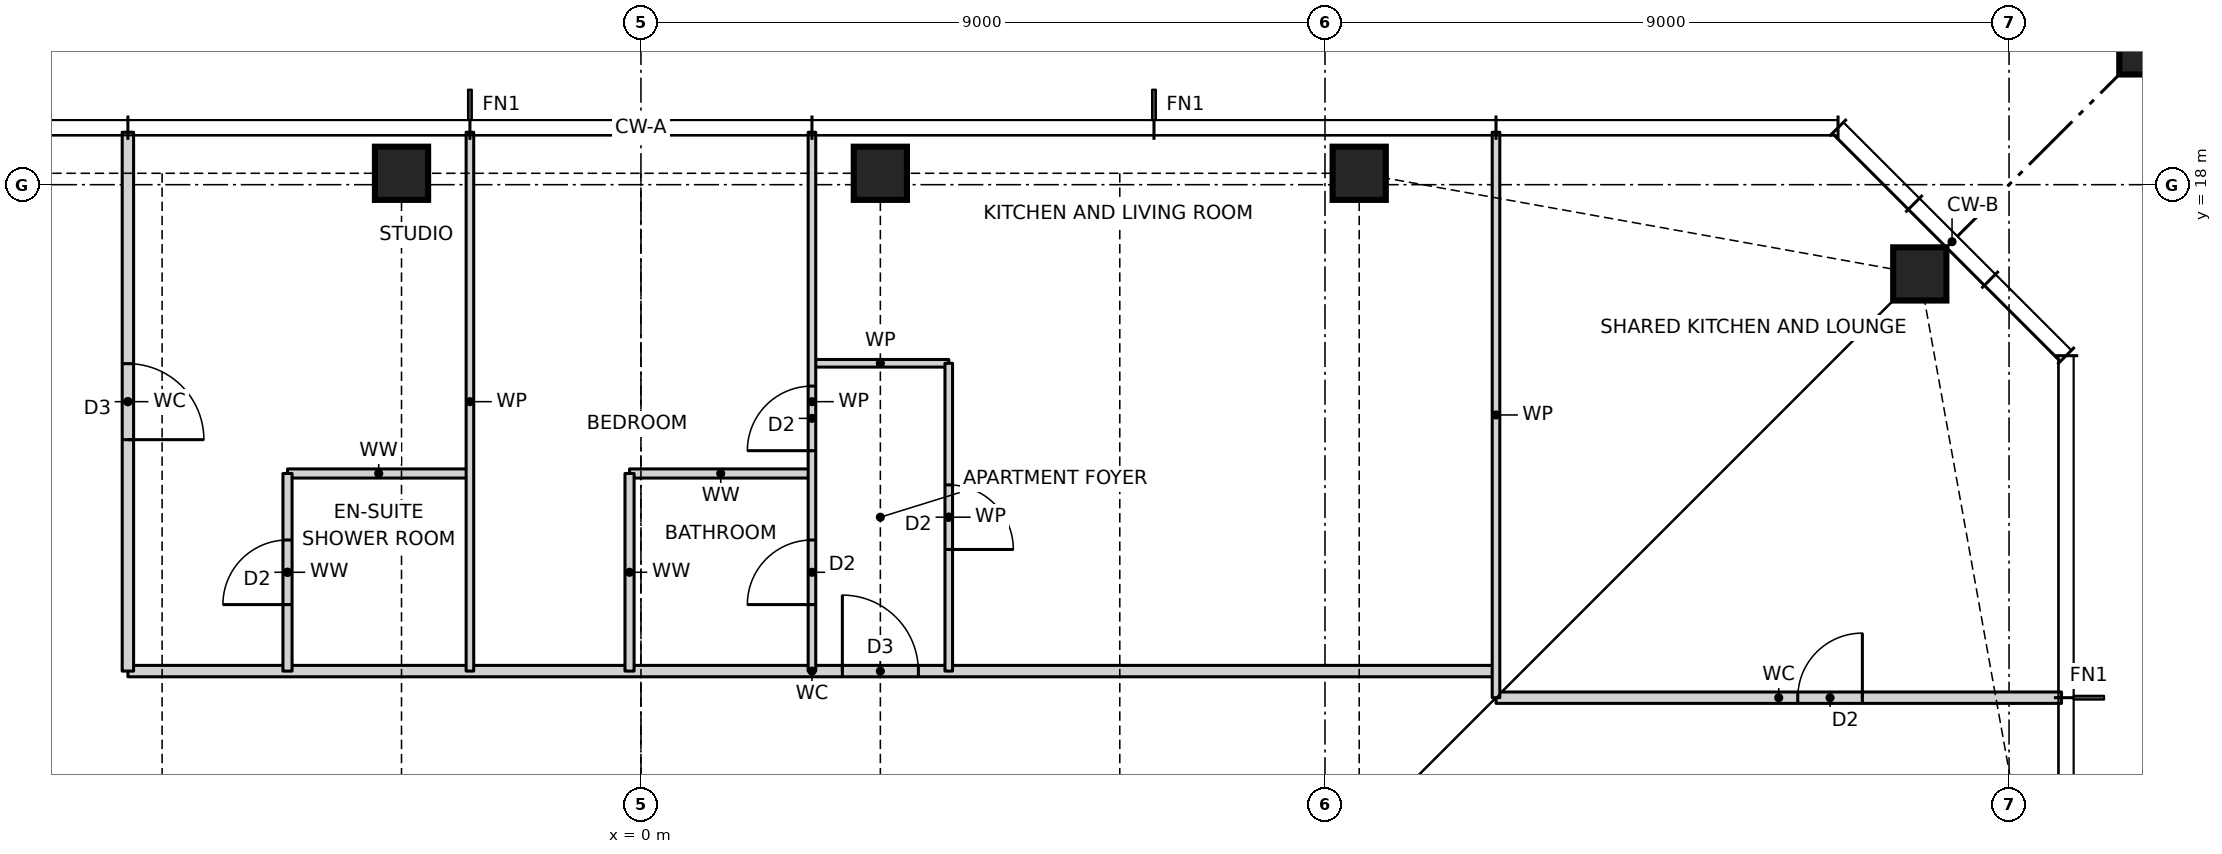
"""IFC4 building model, lengths in metres.
Left out: names, types, materials, properties, quantities, classifications, styles, units other than length and angle.
Written with IfcOpenShell. Run it as: python <this file> out.ifc"""

import sys

from ifc_helpers import new_model, si_unit, direction, frame, frame_2d, origin, origin_2d, place, context, subcontext, project, spatial, rectangle, hollow_rectangle, i_section, extrude, element, fill, save


model = new_model("IFC4")
c1 = context("Model", 3, precision=1e-05, world=origin(), true_north=direction((0.0, 1.0)))
c2 = subcontext(c1, "Body", "Model", "MODEL_VIEW")
j1 = project(units=[si_unit("LENGTHUNIT", "METRE"), si_unit("PLANEANGLEUNIT", "RADIAN")], contexts=[c1])
p1 = place(None, origin())
s1 = spatial("IfcSite", under=j1, at=p1, CompositionType="ELEMENT")
p2 = place(p1, origin())
s2 = spatial("IfcBuilding", under=s1, at=p2, CompositionType="ELEMENT")
p3 = place(p2, frame((0.0, 0.0, 163.5)))
s3 = spatial("IfcBuildingStorey", under=s2, at=p3, CompositionType="ELEMENT", Elevation=163.5)
for number, where, z_axis, x_axis in (
    (1, (16.826, 16.826, 0.0), (0.0, 0.0, 1.0), (1.0, 0.0, 0.0)),
    (2, (9.45, 18.15, 0.0), (0.0, 0.0, 1.0), (1.0, 0.0, 0.0)),
    (3, (3.15, 18.15, 0.0), (0.0, 0.0, 1.0), (1.0, 0.0, 0.0)),
    (4, (-3.15, 18.15, 0.0), (0.0, 0.0, 1.0), (1.0, 0.0, 0.0)),
):
    element("IfcColumn", number, at=place(p3, frame(where, z_axis=z_axis, x_axis=x_axis)), inside=s3, PredefinedType="COLUMN", context=c2, shape_type="SweptSolid", body=[
        extrude(hollow_rectangle(XDim=0.7, YDim=0.7, WallThickness=0.06, at=origin_2d()), origin(), (0.0, 0.0, 1.0), 3.5),
    ])
p4 = place(p3, frame((21.65, 21.65, 0.0), z_axis=(0.0, 0.0, 1.0), x_axis=(1.0, 0.0, 0.0)))
e5 = element("IfcColumn", 5, at=p4, inside=s3, PredefinedType="COLUMN", context=c2, shape_type="SweptSolid", body=[
    extrude(rectangle(XDim=4.4, YDim=4.4, at=origin_2d()), origin(), (0.0, 0.0, 1.0), 3.5),
    extrude(i_section(OverallWidth=0.478, OverallDepth=0.599, WebThickness=0.1, FlangeThickness=0.14, at=origin_2d()), origin(), (0.0, 0.0, 1.0), 3.5),
])
p5 = place(p3, frame((11.25, 11.25, 0.0), z_axis=(0.0, 0.0, 1.0), x_axis=(1.0, 0.0, 0.0)))
e6 = element("IfcWall", 6, at=p5, inside=s3, PredefinedType="PARTITIONING", context=c2, shape_type="SweptSolid", body=[
    extrude(rectangle(XDim=7.44, YDim=0.15, at=frame_2d((3.72, 0.0))), origin(), (0.0, 0.0, 1.0), 3.27),
])
p6 = place(p5, frame((3.97, 0.0, 0.0)))
e7 = element("IfcOpeningElement", 7, at=p6, cuts=e6, PredefinedType="OPENING", context=c2, shape_type="SweptSolid", body=[
    extrude(rectangle(XDim=0.85, YDim=2.1, at=frame_2d((0.425, 1.05))), frame((0.0, 0.085, 0.0), z_axis=(0.0, -1.0, 0.0), x_axis=(1.0, 0.0, 0.0)), (0.0, 0.0, 1.0), 0.17),
])
p7 = place(p3, frame((-6.75, 11.6, 0.0), z_axis=(0.0, 0.0, 1.0), x_axis=(1.0, 0.0, 0.0)))
e8 = element("IfcWall", 8, at=p7, inside=s3, PredefinedType="PARTITIONING", context=c2, shape_type="SweptSolid", body=[
    extrude(rectangle(XDim=18.0, YDim=0.15, at=frame_2d((9.0, 0.0))), origin(), (0.0, 0.0, 1.0), 3.27),
])
p8 = place(p7, frame((9.4, 0.0, 0.0)))
e9 = element("IfcOpeningElement", 9, at=p8, cuts=e8, PredefinedType="OPENING", context=c2, shape_type="SweptSolid", body=[
    extrude(rectangle(XDim=1.0, YDim=2.1, at=frame_2d((0.5, 1.05))), frame((0.0, 0.085, 0.0), z_axis=(0.0, -1.0, 0.0), x_axis=(1.0, 0.0, 0.0)), (0.0, 0.0, 1.0), 0.17),
])
for number, where, z_axis, x_axis in (
    (10, (-4.65, 14.2, 0.0), (0.0, 0.0, 1.0), (1.0, 0.0, 0.0)),
    (11, (-0.15, 14.2, 0.0), (0.0, 0.0, 1.0), (1.0, 0.0, 0.0)),
):
    element("IfcWall", number, at=place(p3, frame(where, z_axis=z_axis, x_axis=x_axis)), inside=s3, PredefinedType="PARTITIONING", context=c2, shape_type="SweptSolid", body=[
        extrude(rectangle(XDim=2.4, YDim=0.12, at=frame_2d((1.2, 0.0))), origin(), (0.0, 0.0, 1.0), 3.27),
    ])
p9 = place(p3, frame((2.25, 15.65, 0.0), z_axis=(0.0, 0.0, 1.0), x_axis=(1.0, 0.0, 0.0)))
e12 = element("IfcWall", 12, at=p9, inside=s3, PredefinedType="PARTITIONING", context=c2, shape_type="SweptSolid", body=[
    extrude(rectangle(XDim=1.8, YDim=0.1, at=frame_2d((0.9, 0.0))), origin(), (0.0, 0.0, 1.0), 3.27),
])
p10 = place(p3, frame((11.25, 11.25, 0.0), z_axis=(0.0, 0.0, 1.0), x_axis=(0.0, 1.0, 0.0)))
e13 = element("IfcWall", 13, at=p10, inside=s3, PredefinedType="PARTITIONING", context=c2, shape_type="SweptSolid", body=[
    extrude(rectangle(XDim=7.44, YDim=0.1, at=frame_2d((3.72, 0.0))), origin(), (0.0, 0.0, 1.0), 3.27),
])
p11 = place(p3, frame((4.05, 11.6, 0.0), z_axis=(0.0, 0.0, 1.0), x_axis=(0.0, 1.0, 0.0)))
e14 = element("IfcWall", 14, at=p11, inside=s3, PredefinedType="PARTITIONING", context=c2, shape_type="SweptSolid", body=[
    extrude(rectangle(XDim=4.05, YDim=0.1, at=frame_2d((2.025, 0.0))), origin(), (0.0, 0.0, 1.0), 3.27),
])
p12 = place(p11, frame((1.6, 0.0, 0.0)))
e15 = element("IfcOpeningElement", 15, at=p12, cuts=e14, PredefinedType="OPENING", context=c2, shape_type="SweptSolid", body=[
    extrude(rectangle(XDim=0.85, YDim=2.1, at=frame_2d((0.425, 1.05))), frame((0.0, 0.06, 0.0), z_axis=(0.0, -1.0, 0.0), x_axis=(1.0, 0.0, 0.0)), (0.0, 0.0, 1.0), 0.12),
])
p13 = place(p3, frame((2.25, 11.6, 0.0), z_axis=(0.0, 0.0, 1.0), x_axis=(0.0, 1.0, 0.0)))
e16 = element("IfcWall", 16, at=p13, inside=s3, PredefinedType="PARTITIONING", context=c2, shape_type="SweptSolid", body=[
    extrude(rectangle(XDim=7.09, YDim=0.1, at=frame_2d((3.545, 0.0))), origin(), (0.0, 0.0, 1.0), 3.27),
])
p14 = place(p13, frame((2.9, 0.0, 0.0)))
e17 = element("IfcOpeningElement", 17, at=p14, cuts=e16, PredefinedType="OPENING", context=c2, shape_type="SweptSolid", body=[
    extrude(rectangle(XDim=0.85, YDim=2.1, at=frame_2d((0.425, 1.05))), frame((0.0, 0.06, 0.0), z_axis=(0.0, -1.0, 0.0), x_axis=(1.0, 0.0, 0.0)), (0.0, 0.0, 1.0), 0.12),
])
p15 = place(p13, frame((0.875, 0.0, 0.0)))
e18 = element("IfcOpeningElement", 18, at=p15, cuts=e16, PredefinedType="OPENING", context=c2, shape_type="SweptSolid", body=[
    extrude(rectangle(XDim=0.85, YDim=2.1, at=frame_2d((0.425, 1.05))), frame((0.0, 0.06, 0.0), z_axis=(0.0, -1.0, 0.0), x_axis=(1.0, 0.0, 0.0)), (0.0, 0.0, 1.0), 0.12),
])
p16 = place(p3, frame((-0.15, 11.6, 0.0), z_axis=(0.0, 0.0, 1.0), x_axis=(0.0, 1.0, 0.0)))
e19 = element("IfcWall", 19, at=p16, inside=s3, PredefinedType="PARTITIONING", context=c2, shape_type="SweptSolid", body=[
    extrude(rectangle(XDim=2.6, YDim=0.12, at=frame_2d((1.3, 0.0))), origin(), (0.0, 0.0, 1.0), 3.27),
])
p17 = place(p3, frame((-2.25, 11.6, 0.0), z_axis=(0.0, 0.0, 1.0), x_axis=(0.0, 1.0, 0.0)))
e20 = element("IfcWall", 20, at=p17, inside=s3, PredefinedType="PARTITIONING", context=c2, shape_type="SweptSolid", body=[
    extrude(rectangle(XDim=7.09, YDim=0.1, at=frame_2d((3.545, 0.0))), origin(), (0.0, 0.0, 1.0), 3.27),
])
p18 = place(p3, frame((-4.65, 11.6, 0.0), z_axis=(0.0, 0.0, 1.0), x_axis=(0.0, 1.0, 0.0)))
e21 = element("IfcWall", 21, at=p18, inside=s3, PredefinedType="PARTITIONING", context=c2, shape_type="SweptSolid", body=[
    extrude(rectangle(XDim=2.6, YDim=0.12, at=frame_2d((1.3, 0.0))), origin(), (0.0, 0.0, 1.0), 3.27),
])
p19 = place(p18, frame((0.875, 0.0, 0.0)))
e22 = element("IfcOpeningElement", 22, at=p19, cuts=e21, PredefinedType="OPENING", context=c2, shape_type="SweptSolid", body=[
    extrude(rectangle(XDim=0.85, YDim=2.1, at=frame_2d((0.425, 1.05))), frame((0.0, 0.07, 0.0), z_axis=(0.0, -1.0, 0.0), x_axis=(1.0, 0.0, 0.0)), (0.0, 0.0, 1.0), 0.14),
])
p20 = place(p3, frame((-6.75, 11.6, 0.0), z_axis=(0.0, 0.0, 1.0), x_axis=(0.0, 1.0, 0.0)))
e23 = element("IfcWall", 23, at=p20, inside=s3, PredefinedType="PARTITIONING", context=c2, shape_type="SweptSolid", body=[
    extrude(rectangle(XDim=7.09, YDim=0.15, at=frame_2d((3.545, 0.0))), origin(), (0.0, 0.0, 1.0), 3.27),
])
p21 = place(p20, frame((3.045, 0.0, 0.0)))
e24 = element("IfcOpeningElement", 24, at=p21, cuts=e23, PredefinedType="OPENING", context=c2, shape_type="SweptSolid", body=[
    extrude(rectangle(XDim=1.0, YDim=2.1, at=frame_2d((0.5, 1.05))), frame((0.0, 0.085, 0.0), z_axis=(0.0, -1.0, 0.0), x_axis=(1.0, 0.0, 0.0)), (0.0, 0.0, 1.0), 0.17),
])
p22 = place(p8, origin())
e25 = element("IfcDoor", 25, at=p22, inside=s3, OperationType="SINGLE_SWING_LEFT", PredefinedType="DOOR", context=c2, shape_type="SweptSolid", body=[
    extrude(rectangle(XDim=1.0, YDim=2.1, at=frame_2d((0.5, 1.05))), frame((0.0, 0.025, 0.0), z_axis=(0.0, -1.0, 0.0), x_axis=(1.0, 0.0, 0.0)), (0.0, 0.0, 1.0), 0.05),
])
fill(e9, e25)
p23 = place(p12, frame((0.85, 0.0, 0.0), z_axis=(0.0, 0.0, 1.0), x_axis=(-1.0, 0.0, 0.0)))
e26 = element("IfcDoor", 26, at=p23, inside=s3, OperationType="SINGLE_SWING_RIGHT", PredefinedType="DOOR", context=c2, shape_type="SweptSolid", body=[
    extrude(rectangle(XDim=0.85, YDim=2.1, at=frame_2d((0.425, 1.05))), frame((0.0, 0.025, 0.0), z_axis=(0.0, -1.0, 0.0), x_axis=(1.0, 0.0, 0.0)), (0.0, 0.0, 1.0), 0.05),
])
fill(e15, e26)
p24 = place(p14, origin())
e27 = element("IfcDoor", 27, at=p24, inside=s3, OperationType="SINGLE_SWING_LEFT", PredefinedType="DOOR", context=c2, shape_type="SweptSolid", body=[
    extrude(rectangle(XDim=0.85, YDim=2.1, at=frame_2d((0.425, 1.05))), frame((0.0, 0.025, 0.0), z_axis=(0.0, -1.0, 0.0), x_axis=(1.0, 0.0, 0.0)), (0.0, 0.0, 1.0), 0.05),
])
fill(e17, e27)
p25 = place(p15, origin())
e28 = element("IfcDoor", 28, at=p25, inside=s3, OperationType="SINGLE_SWING_LEFT", PredefinedType="DOOR", context=c2, shape_type="SweptSolid", body=[
    extrude(rectangle(XDim=0.85, YDim=2.1, at=frame_2d((0.425, 1.05))), frame((0.0, 0.025, 0.0), z_axis=(0.0, -1.0, 0.0), x_axis=(1.0, 0.0, 0.0)), (0.0, 0.0, 1.0), 0.05),
])
fill(e18, e28)
p26 = place(p21, frame((1.0, 0.0, 0.0), z_axis=(0.0, 0.0, 1.0), x_axis=(-1.0, 0.0, 0.0)))
e29 = element("IfcDoor", 29, at=p26, inside=s3, OperationType="SINGLE_SWING_RIGHT", PredefinedType="DOOR", context=c2, shape_type="SweptSolid", body=[
    extrude(rectangle(XDim=1.0, YDim=2.1, at=frame_2d((0.5, 1.05))), frame((0.0, 0.025, 0.0), z_axis=(0.0, -1.0, 0.0), x_axis=(1.0, 0.0, 0.0)), (0.0, 0.0, 1.0), 0.05),
])
fill(e24, e29)
p27 = place(p19, origin())
e30 = element("IfcDoor", 30, at=p27, inside=s3, OperationType="SINGLE_SWING_LEFT", PredefinedType="DOOR", context=c2, shape_type="SweptSolid", body=[
    extrude(rectangle(XDim=0.85, YDim=2.1, at=frame_2d((0.425, 1.05))), frame((0.0, 0.025, 0.0), z_axis=(0.0, -1.0, 0.0), x_axis=(1.0, 0.0, 0.0)), (0.0, 0.0, 1.0), 0.05),
])
fill(e22, e30)
p28 = place(p6, origin())
e31 = element("IfcDoor", 31, at=p28, inside=s3, OperationType="SINGLE_SWING_RIGHT", PredefinedType="DOOR", context=c2, shape_type="SweptSolid", body=[
    extrude(rectangle(XDim=0.85, YDim=2.1, at=frame_2d((0.425, 1.05))), frame((0.0, 0.025, 0.0), z_axis=(0.0, -1.0, 0.0), x_axis=(1.0, 0.0, 0.0)), (0.0, 0.0, 1.0), 0.05),
])
fill(e7, e31)
save(model, sys.argv[1])
